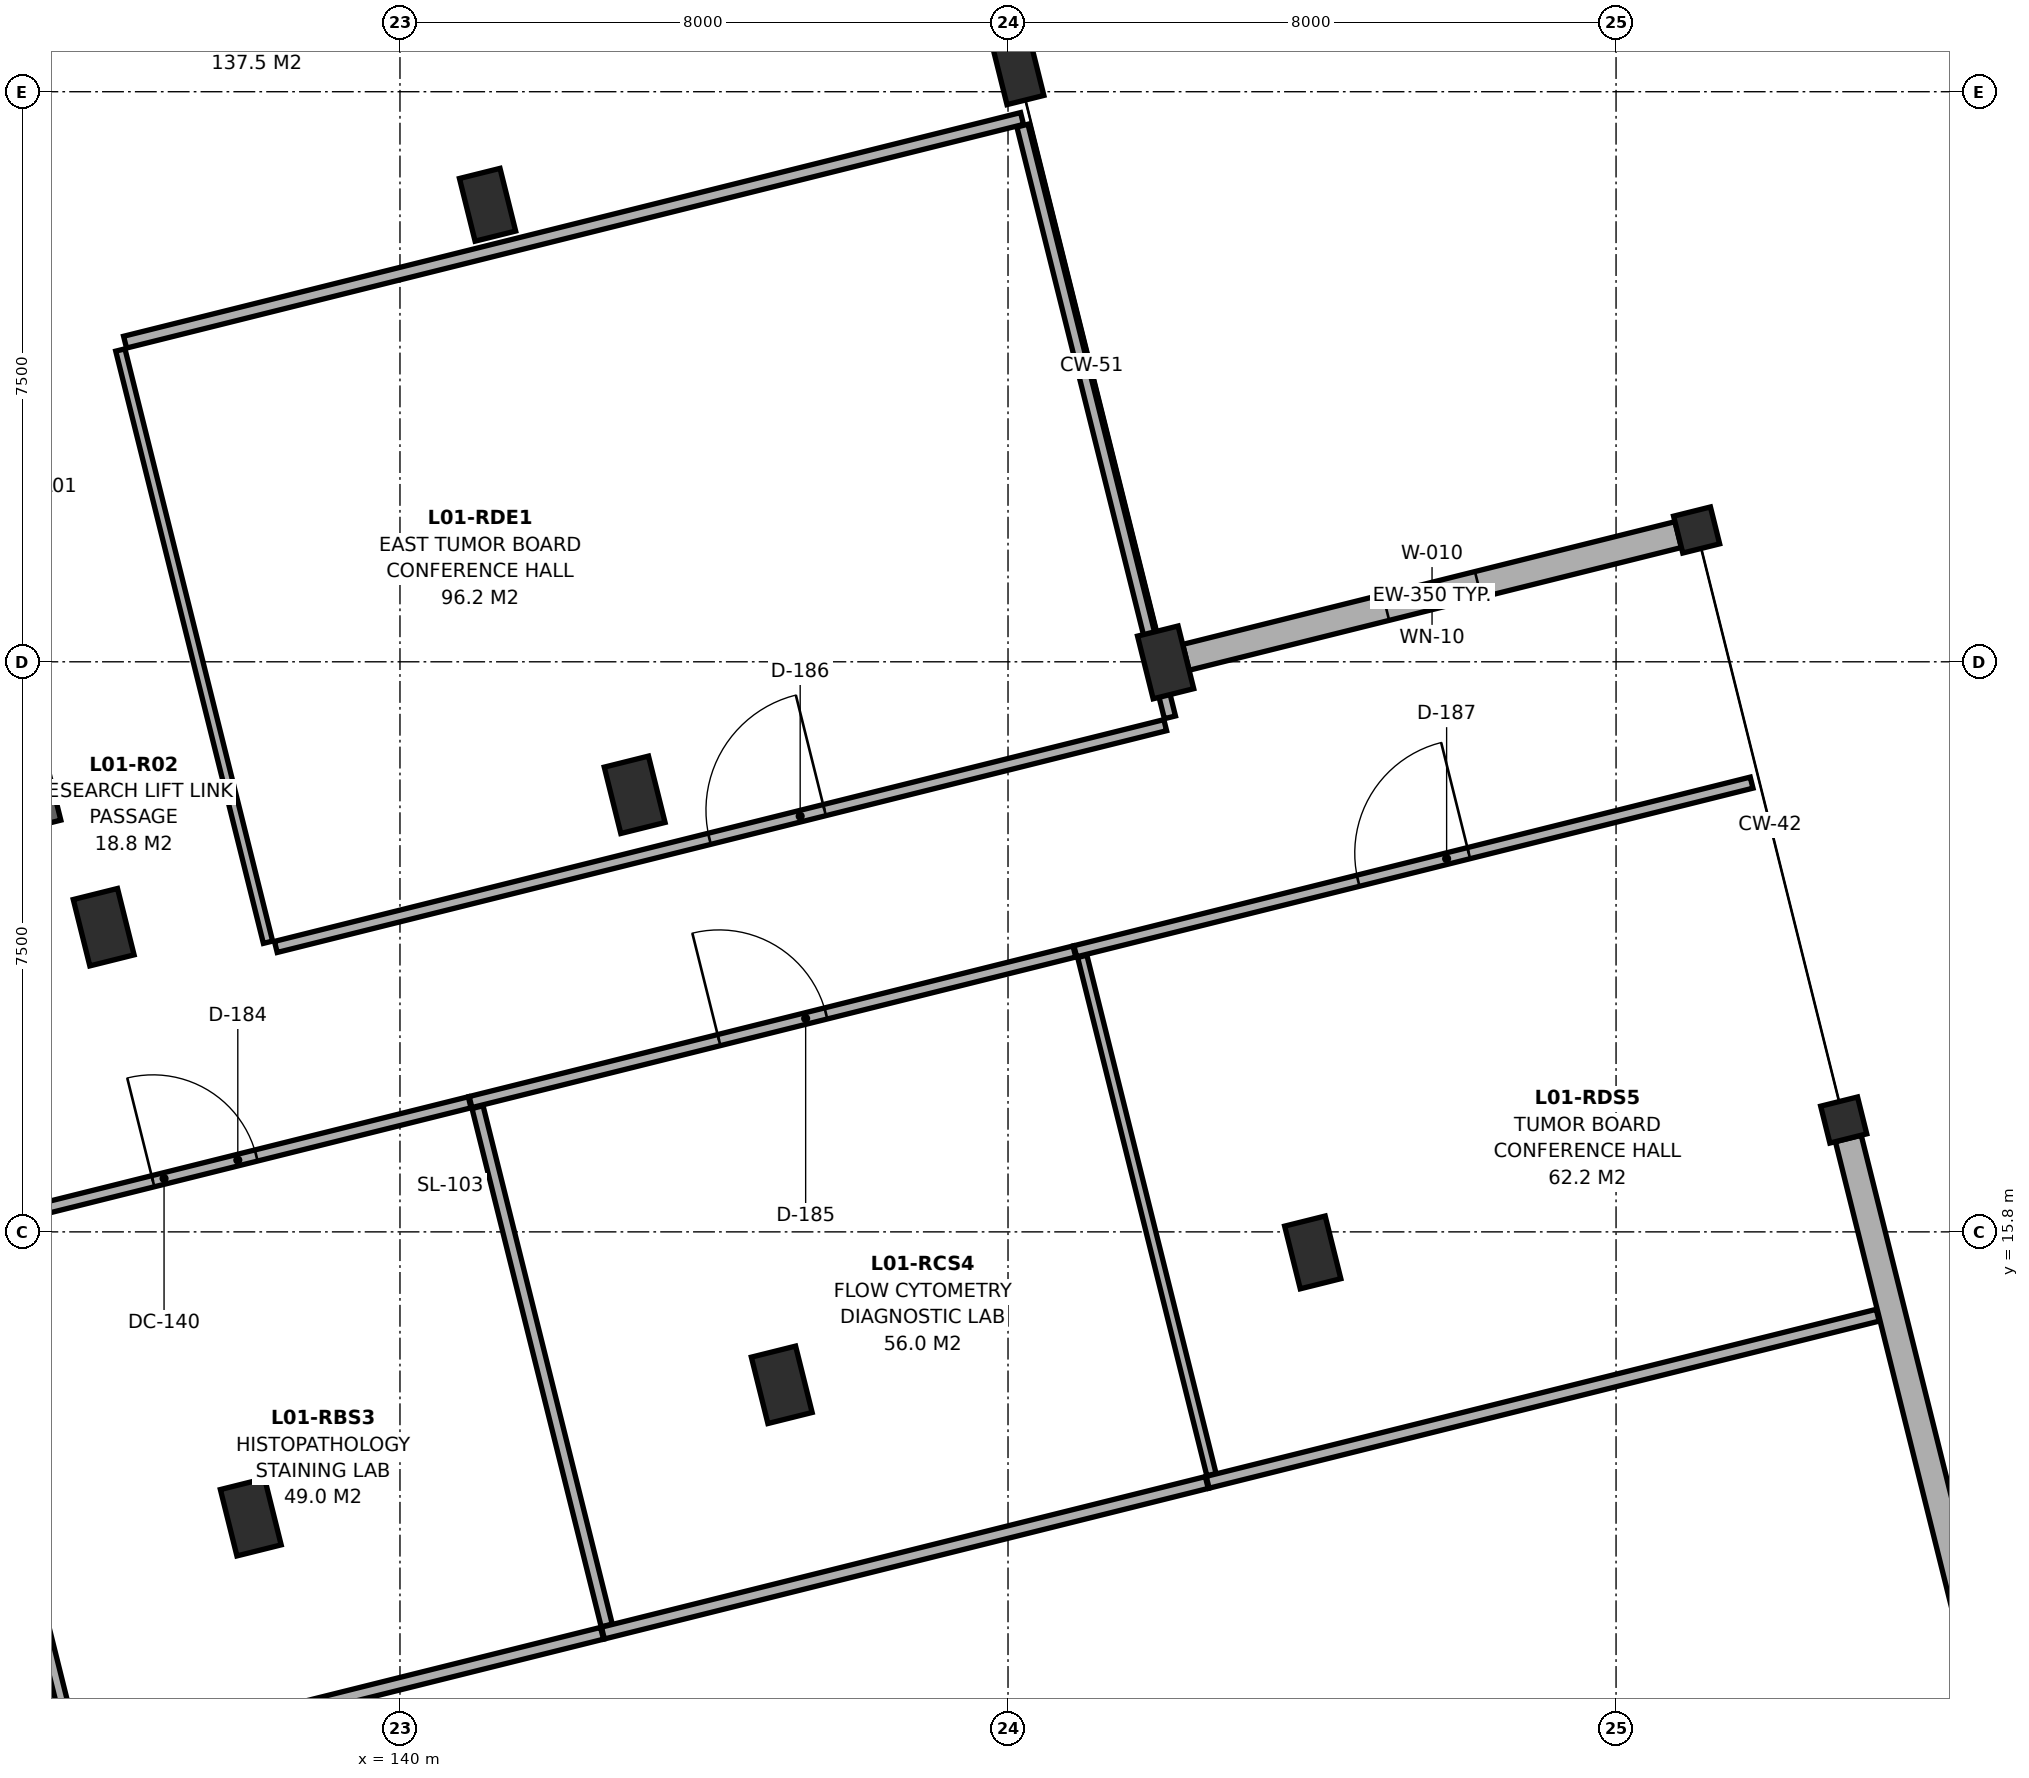
"""IFC4 building model, lengths in metres.
Left out: names, types, materials, properties, quantities, classifications, styles, units other than length and angle.
Written with IfcOpenShell. Run it as: python <this file> out.ifc"""

import sys

from ifc_helpers import new_model, si_unit, direction, frame, frame_2d, origin, origin_2d, place, context, subcontext, project, spatial, rectangle, extrude, element, fill, save


model = new_model("IFC4")
c1 = context("Model", 3, precision=1e-05, world=origin(), true_north=direction((0.0, 1.0)))
c2 = subcontext(c1, "Body", "Model", "MODEL_VIEW")
j1 = project(units=[si_unit("LENGTHUNIT", "METRE"), si_unit("PLANEANGLEUNIT", "RADIAN")], contexts=[c1])
p1 = place(None, origin())
s1 = spatial("IfcSite", under=j1, at=p1, CompositionType="ELEMENT")
p2 = place(p1, origin())
s2 = spatial("IfcBuilding", under=s1, at=p2, CompositionType="ELEMENT")
p3 = place(p2, frame((0.0, 0.0, 5.0)))
s3 = spatial("IfcBuildingStorey", under=s2, at=p3, CompositionType="ELEMENT", Elevation=5.0)
for number, where, z_axis, x_axis in (
    (1, (138.037, 12.046, 0.0), (0.0, 0.0, 1.0), (0.97, 0.242, 0.0)),
    (2, (136.102, 19.808, 0.0), (0.0, 0.0, 1.0), (0.97, 0.242, 0.0)),
    (3, (145.023, 13.788, 0.0), (0.0, 0.0, 1.0), (0.97, 0.242, 0.0)),
    (4, (143.088, 21.55, 0.0), (0.0, 0.0, 1.0), (0.97, 0.242, 0.0)),
):
    element("IfcColumn", number, at=place(p3, frame(where, z_axis=z_axis, x_axis=x_axis)), inside=s3, PredefinedType="COLUMN", context=c2, shape_type="SweptSolid", body=[
        extrude(rectangle(XDim=0.6, YDim=0.9, at=origin_2d()), origin(), (0.0, 0.0, 1.0), 4.2),
    ])
for number, where, z_axis, x_axis in (
    (5, (141.152, 29.312, 0.0), (0.0, 0.0, 1.0), (0.97, 0.242, 0.0)),
    (6, (152.009, 15.53, 0.0), (0.0, 0.0, 1.0), (0.97, 0.242, 0.0)),
    (7, (150.074, 23.292, 0.0), (0.0, 0.0, 1.0), (0.97, 0.242, 0.0)),
):
    element("IfcColumn", number, at=place(p3, frame(where, z_axis=z_axis, x_axis=x_axis)), inside=s3, PredefinedType="COLUMN", context=c2, shape_type="SweptSolid", body=[
        extrude(rectangle(XDim=0.55, YDim=0.85, at=origin_2d()), origin(), (0.0, 0.0, 1.0), 4.2),
    ])
p4 = place(p3, frame((148.138, 31.054, 0.0), z_axis=(0.0, 0.0, 1.0), x_axis=(0.970295726276, 0.2419218956, 0.0)))
e8 = element("IfcColumn", 8, at=p4, inside=s3, PredefinedType="COLUMN", context=c2, shape_type="SweptSolid", body=[
    extrude(rectangle(XDim=0.5, YDim=0.75, at=origin_2d()), origin(), (0.0, 0.0, 1.0), 4.2),
])
for number, where, z_axis, x_axis in (
    (9, (158.995, 17.271, 0.0), (0.0, 0.0, 1.0), (0.97, 0.242, 0.0)),
    (10, (157.06, 25.034, 0.0), (0.0, 0.0, 1.0), (0.97, 0.242, 0.0)),
):
    element("IfcColumn", number, at=place(p3, frame(where, z_axis=z_axis, x_axis=x_axis)), inside=s3, PredefinedType="COLUMN", context=c2, shape_type="SweptSolid", body=[
        extrude(rectangle(XDim=0.5, YDim=0.5, at=origin_2d()), origin(), (0.0, 0.0, 1.0), 5.596),
    ])
p5 = place(p3, frame((150.341, 23.359, 0.0), z_axis=(0.0, 0.0, 1.0), x_axis=(0.970299354279, 0.241907344009, 0.0)))
e11 = element("IfcWall", 11, at=p5, inside=s3, PredefinedType="SOLIDWALL", context=c2, shape_type="SweptSolid", body=[
    extrude(rectangle(XDim=6.675, YDim=0.35, at=frame_2d((3.337, 0.0))), origin(), (0.0, 0.0, 1.0), 3.485),
])
p6 = place(p5, frame((2.712, 0.0, 0.9)))
e12 = element("IfcOpeningElement", 12, at=p6, cuts=e11, PredefinedType="OPENING", context=c2, shape_type="SweptSolid", body=[
    extrude(rectangle(XDim=1.25, YDim=1.5, at=frame_2d((0.625, 0.75))), frame((0.0, 0.187, 0.0), z_axis=(0.0, -1.0, 0.0), x_axis=(1.0, 0.0, 0.0)), (0.0, 0.0, 1.0), 0.374),
])
p7 = place(p3, frame((159.056, 17.029, 0.0), z_axis=(0.0, 0.0, 1.0), x_axis=(0.241922842305, -0.970295490235, 0.0)))
e13 = element("IfcWall", 13, at=p7, inside=s3, PredefinedType="SOLIDWALL", context=c2, shape_type="SweptSolid", body=[
    extrude(rectangle(XDim=7.5, YDim=0.35, at=frame_2d((3.75, 0.0))), origin(), (0.0, 0.0, 1.0), 4.17),
])
p8 = place(p3, frame((135.402, 21.183, 0.0), z_axis=(0.0, 0.0, 1.0), x_axis=(-0.241921647353, 0.970295788171, 0.0)))
e14 = element("IfcWall", 14, at=p8, inside=s3, PredefinedType="SHEAR", context=c2, shape_type="SweptSolid", body=[
    extrude(rectangle(XDim=2.994, YDim=0.28, at=frame_2d((1.497, 0.0))), origin(), (0.0, 0.0, 1.0), 4.2),
])
p9 = place(p3, frame((133.942, 15.766, 0.0), z_axis=(0.0, 0.0, 1.0), x_axis=(0.970292162734, 0.241936187739, 0.0)))
e15 = element("IfcWall", 15, at=p9, inside=s3, PredefinedType="PARTITIONING", context=c2, shape_type="SweptSolid", body=[
    extrude(rectangle(XDim=7.188, YDim=0.15, at=frame_2d((3.594, 0.0))), origin(), (0.0, 0.0, 1.0), 3.385),
])
p10 = place(p9, frame((2.894, 0.0, 0.0)))
e16 = element("IfcOpeningElement", 16, at=p10, cuts=e15, PredefinedType="OPENING", context=c2, shape_type="SweptSolid", body=[
    extrude(rectangle(XDim=1.4, YDim=2.25, at=frame_2d((0.7, 1.125))), frame((0.0, 0.087, 0.0), z_axis=(0.0, -1.0, 0.0), x_axis=(1.0, 0.0, 0.0)), (0.0, 0.0, 1.0), 0.174),
])
p11 = place(p3, frame((140.928, 17.508, 0.0), z_axis=(0.0, 0.0, 1.0), x_axis=(0.970293149657, 0.241932229621, 0.0)))
e17 = element("IfcWall", 17, at=p11, inside=s3, PredefinedType="PARTITIONING", context=c2, shape_type="SweptSolid", body=[
    extrude(rectangle(XDim=8.188, YDim=0.15, at=frame_2d((4.094, 0.0))), origin(), (0.0, 0.0, 1.0), 3.385),
])
p12 = place(p11, frame((3.369, 0.0, 0.0)))
e18 = element("IfcOpeningElement", 18, at=p12, cuts=e17, PredefinedType="OPENING", context=c2, shape_type="SweptSolid", body=[
    extrude(rectangle(XDim=1.45, YDim=2.26, at=frame_2d((0.725, 1.13))), frame((0.0, 0.087, 0.0), z_axis=(0.0, -1.0, 0.0), x_axis=(1.0, 0.0, 0.0)), (0.0, 0.0, 1.0), 0.174),
])
p13 = place(p3, frame((148.885, 19.491, 0.0), z_axis=(0.0, 0.0, 1.0), x_axis=(0.970294203895, 0.241928001454, 0.0)))
e19 = element("IfcWall", 19, at=p13, inside=s3, PredefinedType="PARTITIONING", context=c2, shape_type="SweptSolid", body=[
    extrude(rectangle(XDim=9.171, YDim=0.15, at=frame_2d((4.585, 0.0))), origin(), (0.0, 0.0, 1.0), 3.485),
])
p14 = place(p13, frame((3.835, 0.0, 0.0)))
e20 = element("IfcOpeningElement", 20, at=p14, cuts=e19, PredefinedType="OPENING", context=c2, shape_type="SweptSolid", body=[
    extrude(rectangle(XDim=1.5, YDim=2.28, at=frame_2d((0.75, 1.14))), frame((0.0, 0.087, 0.0), z_axis=(0.0, -1.0, 0.0), x_axis=(1.0, 0.0, 0.0)), (0.0, 0.0, 1.0), 0.174),
])
p15 = place(p3, frame((138.367, 19.549, 0.0), z_axis=(0.0, 0.0, 1.0), x_axis=(0.970292357867, 0.241935405151, 0.0)))
e21 = element("IfcWall", 21, at=p15, inside=s3, PredefinedType="PARTITIONING", context=c2, shape_type="SweptSolid", body=[
    extrude(rectangle(XDim=12.06, YDim=0.15, at=frame_2d((6.03, 0.0))), origin(), (0.0, 0.0, 1.0), 3.385),
])
p16 = place(p15, frame((5.88, 0.0, 0.0)))
e22 = element("IfcOpeningElement", 22, at=p16, cuts=e21, PredefinedType="OPENING", context=c2, shape_type="SweptSolid", body=[
    extrude(rectangle(XDim=1.56, YDim=2.3, at=frame_2d((0.78, 1.15))), frame((0.0, 0.087, 0.0), z_axis=(0.0, -1.0, 0.0), x_axis=(1.0, 0.0, 0.0)), (0.0, 0.0, 1.0), 0.174),
])
p17 = place(p3, frame((135.733, 8.887, 0.0), z_axis=(0.0, 0.0, 1.0), x_axis=(-0.241913757308, 0.970297755344, 0.0)))
e23 = element("IfcWall", 23, at=p17, inside=s3, PredefinedType="PARTITIONING", context=c2, shape_type="SweptSolid", body=[
    extrude(rectangle(XDim=7.021, YDim=0.15, at=frame_2d((3.51, 0.0))), origin(), (0.0, 0.0, 1.0), 3.485),
])
p18 = place(p3, frame((138.479, 9.477, 0.0), z_axis=(0.0, 0.0, 1.0), x_axis=(0.970295647322, 0.241922212266, 0.0)))
e24 = element("IfcWall", 24, at=p18, inside=s3, PredefinedType="PARTITIONING", context=c2, shape_type="SweptSolid", body=[
    extrude(rectangle(XDim=4.308, YDim=0.16, at=frame_2d((2.154, 0.0))), origin(), (0.0, 0.0, 1.0), 3.385),
])
p19 = place(p3, frame((142.72, 10.622, 0.0), z_axis=(0.0, 0.0, 1.0), x_axis=(-0.241914380839, 0.970297599885, 0.0)))
e25 = element("IfcWall", 25, at=p19, inside=s3, PredefinedType="PARTITIONING", context=c2, shape_type="SweptSolid", body=[
    extrude(rectangle(XDim=7.028, YDim=0.15, at=frame_2d((3.514, 0.0))), origin(), (0.0, 0.0, 1.0), 3.485),
])
p20 = place(p3, frame((142.67, 10.522, 0.0), z_axis=(0.0, 0.0, 1.0), x_axis=(0.970298403727, 0.241911156677, 0.0)))
e26 = element("IfcWall", 26, at=p20, inside=s3, PredefinedType="PARTITIONING", context=c2, shape_type="SweptSolid", body=[
    extrude(rectangle(XDim=8.188, YDim=0.16, at=frame_2d((4.094, 0.0))), origin(), (0.0, 0.0, 1.0), 3.385),
])
p21 = place(p3, frame((150.677, 12.605, 0.0), z_axis=(0.0, 0.0, 1.0), x_axis=(-0.241914380839, 0.970297599885, 0.0)))
e27 = element("IfcWall", 27, at=p21, inside=s3, PredefinedType="PARTITIONING", context=c2, shape_type="SweptSolid", body=[
    extrude(rectangle(XDim=7.028, YDim=0.125, at=frame_2d((3.514, 0.0))), origin(), (0.0, 0.0, 1.0), 3.485),
])
p22 = place(p3, frame((150.627, 12.505, 0.0), z_axis=(0.0, 0.0, 1.0), x_axis=(0.970292468543, 0.241934961279, 0.0)))
e28 = element("IfcWall", 28, at=p22, inside=s3, PredefinedType="PARTITIONING", context=c2, shape_type="SweptSolid", body=[
    extrude(rectangle(XDim=9.086, YDim=0.16, at=frame_2d((4.543, 0.0))), origin(), (0.0, 0.0, 1.0), 3.485),
])
p23 = place(p3, frame((136.383, 27.505, 0.0), z_axis=(0.0, 0.0, 1.0), x_axis=(0.970298155851, 0.241912150896, 0.0)))
e29 = element("IfcWall", 29, at=p23, inside=s3, PredefinedType="PARTITIONING", context=c2, shape_type="SweptSolid", body=[
    extrude(rectangle(XDim=12.163, YDim=0.16, at=frame_2d((6.082, 0.0))), origin(), (0.0, 0.0, 1.0), 3.385),
])
p24 = place(p3, frame((138.264, 19.611, 0.0), z_axis=(0.0, 0.0, 1.0), x_axis=(-0.241920353256, 0.970296110824, 0.0)))
e30 = element("IfcWall", 30, at=p24, inside=s3, PredefinedType="PARTITIONING", context=c2, shape_type="SweptSolid", body=[
    extrude(rectangle(XDim=8.03, YDim=0.125, at=frame_2d((4.015, 0.0))), origin(), (0.0, 0.0, 1.0), 3.485),
])
p25 = place(p3, frame((150.13, 22.569, 0.0), z_axis=(0.0, 0.0, 1.0), x_axis=(-0.241919812841, 0.970296245564, 0.0)))
e31 = element("IfcWall", 31, at=p25, inside=s3, PredefinedType="PARTITIONING", context=c2, shape_type="SweptSolid", body=[
    extrude(rectangle(XDim=8.023, YDim=0.15, at=frame_2d((4.011, 0.0))), origin(), (0.0, 0.0, 1.0), 3.485),
])
p26 = place(p6, origin())
e32 = element("IfcWindow", 32, at=p26, inside=s3, PartitioningType="SINGLE_PANEL", PredefinedType="WINDOW", context=c2, shape_type="SweptSolid", body=[
    extrude(rectangle(XDim=1.25, YDim=1.5, at=frame_2d((0.625, 0.75))), frame((0.0, 0.03, 0.0), z_axis=(0.0, -1.0, 0.0), x_axis=(1.0, 0.0, 0.0)), (0.0, 0.0, 1.0), 0.06),
])
fill(e12, e32)
p27 = place(p10, origin())
e33 = element("IfcDoor", 33, at=p27, inside=s3, OperationType="SINGLE_SWING_LEFT", PredefinedType="DOOR", context=c2, shape_type="SweptSolid", body=[
    extrude(rectangle(XDim=1.4, YDim=2.25, at=frame_2d((0.7, 1.125))), frame((0.0, 0.025, 0.0), z_axis=(0.0, -1.0, 0.0), x_axis=(1.0, 0.0, 0.0)), (0.0, 0.0, 1.0), 0.05),
])
fill(e16, e33)
p28 = place(p12, origin())
e34 = element("IfcDoor", 34, at=p28, inside=s3, OperationType="SINGLE_SWING_LEFT", PredefinedType="DOOR", context=c2, shape_type="SweptSolid", body=[
    extrude(rectangle(XDim=1.45, YDim=2.26, at=frame_2d((0.725, 1.13))), frame((0.0, 0.025, 0.0), z_axis=(0.0, -1.0, 0.0), x_axis=(1.0, 0.0, 0.0)), (0.0, 0.0, 1.0), 0.05),
])
fill(e18, e34)
p29 = place(p14, origin())
e35 = element("IfcDoor", 35, at=p29, inside=s3, OperationType="SINGLE_SWING_RIGHT", PredefinedType="DOOR", context=c2, shape_type="SweptSolid", body=[
    extrude(rectangle(XDim=1.5, YDim=2.28, at=frame_2d((0.75, 1.14))), frame((0.0, 0.025, 0.0), z_axis=(0.0, -1.0, 0.0), x_axis=(1.0, 0.0, 0.0)), (0.0, 0.0, 1.0), 0.05),
])
fill(e20, e35)
p30 = place(p16, origin())
e36 = element("IfcDoor", 36, at=p30, inside=s3, OperationType="SINGLE_SWING_RIGHT", PredefinedType="DOOR", context=c2, shape_type="SweptSolid", body=[
    extrude(rectangle(XDim=1.56, YDim=2.3, at=frame_2d((0.78, 1.15))), frame((0.0, 0.025, 0.0), z_axis=(0.0, -1.0, 0.0), x_axis=(1.0, 0.0, 0.0)), (0.0, 0.0, 1.0), 0.05),
])
fill(e22, e36)
save(model, sys.argv[1])
